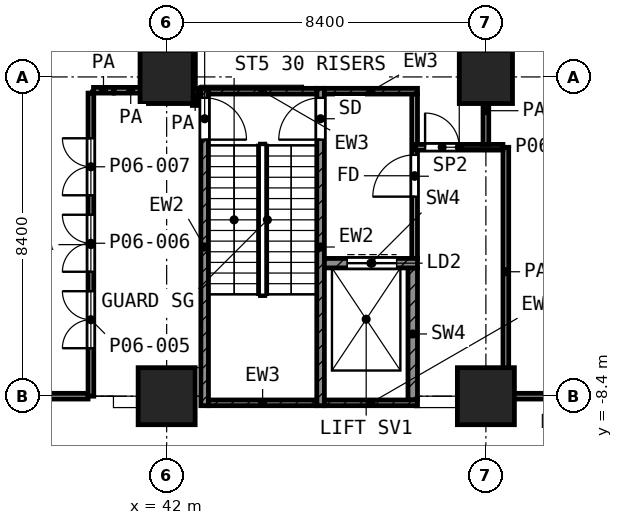
"""IFC4 building model, lengths in metres.
Left out: names, types, materials, properties, quantities, classifications, styles, units other than length and angle.
Written with IfcOpenShell. Run it as: python <this file> out.ifc"""

import sys

from ifc_helpers import new_model, si_unit, direction, frame, frame_2d, origin, origin_2d, place, context, subcontext, project, spatial, rectangle, extrude, element, fill, save


model = new_model("IFC4")
c1 = context("Model", 3, precision=1e-05, world=origin(), true_north=direction((0.0, 1.0)))
c2 = subcontext(c1, "Body", "Model", "MODEL_VIEW")
j1 = project(units=[si_unit("LENGTHUNIT", "METRE"), si_unit("PLANEANGLEUNIT", "RADIAN")], contexts=[c1])
p1 = place(None, origin())
s1 = spatial("IfcSite", under=j1, at=p1, CompositionType="ELEMENT")
p2 = place(p1, origin())
s2 = spatial("IfcBuilding", under=s1, at=p2, CompositionType="ELEMENT")
p3 = place(p2, frame((0.0, 0.0, 29.0)))
s3 = spatial("IfcBuildingStorey", under=s2, at=p3, CompositionType="ELEMENT", Elevation=29.0)
for number, where, z_axis, x_axis in (
    (1, (42.0, 0.0, 0.0), (0.0, 0.0, 1.0), (1.0, 0.0, 0.0)),
    (2, (50.4, 0.0, 0.0), (0.0, 0.0, 1.0), (1.0, 0.0, 0.0)),
):
    element("IfcColumn", number, at=place(p3, frame(where, z_axis=z_axis, x_axis=x_axis)), inside=s3, PredefinedType="COLUMN", context=c2, shape_type="SweptSolid", body=[
        extrude(rectangle(XDim=1.4, YDim=1.4, at=origin_2d()), origin(), (0.0, 0.0, 1.0), 5.2),
    ])
for number, where, z_axis, x_axis in (
    (3, (42.0, -8.4, 0.0), (0.0, 0.0, 1.0), (1.0, 0.0, 0.0)),
    (4, (50.4, -8.4, 0.0), (0.0, 0.0, 1.0), (1.0, 0.0, 0.0)),
):
    element("IfcColumn", number, at=place(p3, frame(where, z_axis=z_axis, x_axis=x_axis)), inside=s3, PredefinedType="COLUMN", context=c2, shape_type="SweptSolid", body=[
        extrude(rectangle(XDim=1.5, YDim=1.5, at=origin_2d()), origin(), (0.0, 0.0, 1.0), 5.2),
    ])
p4 = place(p3, frame((43.0, -8.65, 0.0), z_axis=(0.0, 0.0, 1.0), x_axis=(0.0, 1.0, 0.0)))
e5 = element("IfcWall", 5, at=p4, inside=s3, PredefinedType="SHEAR", context=c2, shape_type="SweptSolid", body=[
    extrude(rectangle(XDim=8.35, YDim=0.2, at=frame_2d((4.175, 0.0))), origin(), (0.0, 0.0, 1.0), 4.7),
])
p5 = place(p4, frame((7.0, 0.0, 0.0)))
e6 = element("IfcOpeningElement", 6, at=p5, cuts=e5, PredefinedType="OPENING", context=c2, shape_type="SweptSolid", body=[
    extrude(rectangle(XDim=1.1, YDim=2.1, at=frame_2d((0.55, 1.05))), frame((0.0, 0.11, 0.0), z_axis=(0.0, -1.0, 0.0), x_axis=(1.0, 0.0, 0.0)), (0.0, 0.0, 1.0), 0.22),
])
p6 = place(p3, frame((46.05, -8.65, 0.0), z_axis=(0.0, 0.0, 1.0), x_axis=(0.0, 1.0, 0.0)))
e7 = element("IfcWall", 7, at=p6, inside=s3, PredefinedType="SHEAR", context=c2, shape_type="SweptSolid", body=[
    extrude(rectangle(XDim=8.35, YDim=0.2, at=frame_2d((4.175, 0.0))), origin(), (0.0, 0.0, 1.0), 4.7),
])
p7 = place(p6, frame((7.0, 0.0, 0.0)))
e8 = element("IfcOpeningElement", 8, at=p7, cuts=e7, PredefinedType="OPENING", context=c2, shape_type="SweptSolid", body=[
    extrude(rectangle(XDim=1.1, YDim=2.1, at=frame_2d((0.55, 1.05))), frame((0.0, 0.11, 0.0), z_axis=(0.0, -1.0, 0.0), x_axis=(1.0, 0.0, 0.0)), (0.0, 0.0, 1.0), 0.22),
])
p8 = place(p3, frame((43.1, -0.375, 0.0), z_axis=(0.0, 0.0, 1.0), x_axis=(1.0, 0.0, 0.0)))
e9 = element("IfcWall", 9, at=p8, inside=s3, PredefinedType="SHEAR", context=c2, shape_type="SweptSolid", body=[
    extrude(rectangle(XDim=2.85, YDim=0.15, at=frame_2d((1.425, 0.0))), origin(), (0.0, 0.0, 1.0), 4.7),
])
p9 = place(p3, frame((46.15, -0.375, 0.0), z_axis=(0.0, 0.0, 1.0), x_axis=(1.0, 0.0, 0.0)))
e10 = element("IfcWall", 10, at=p9, inside=s3, PredefinedType="SHEAR", context=c2, shape_type="SweptSolid", body=[
    extrude(rectangle(XDim=2.45, YDim=0.15, at=frame_2d((1.225, 0.0))), origin(), (0.0, 0.0, 1.0), 4.7),
])
p10 = place(p3, frame((43.1, -8.575, 0.0), z_axis=(0.0, 0.0, 1.0), x_axis=(1.0, 0.0, 0.0)))
e11 = element("IfcWall", 11, at=p10, inside=s3, PredefinedType="SHEAR", context=c2, shape_type="SweptSolid", body=[
    extrude(rectangle(XDim=2.85, YDim=0.15, at=frame_2d((1.425, 0.0))), origin(), (0.0, 0.0, 1.0), 4.7),
])
p11 = place(p3, frame((46.15, -8.575, 0.0), z_axis=(0.0, 0.0, 1.0), x_axis=(1.0, 0.0, 0.0)))
e12 = element("IfcWall", 12, at=p11, inside=s3, PredefinedType="SHEAR", context=c2, shape_type="SweptSolid", body=[
    extrude(rectangle(XDim=2.45, YDim=0.15, at=frame_2d((1.225, 0.0))), origin(), (0.0, 0.0, 1.0), 4.7),
])
p12 = place(p3, frame((46.15, -4.9, 0.0), z_axis=(0.0, 0.0, 1.0), x_axis=(1.0, 0.0, 0.0)))
e13 = element("IfcWall", 13, at=p12, inside=s3, PredefinedType="SHEAR", context=c2, shape_type="SweptSolid", body=[
    extrude(rectangle(XDim=2.45, YDim=0.25, at=frame_2d((1.225, 0.0))), origin(), (0.0, 0.0, 1.0), 4.7),
])
p13 = place(p12, frame((0.6, 0.0, 0.0)))
e14 = element("IfcOpeningElement", 14, at=p13, cuts=e13, PredefinedType="OPENING", context=c2, shape_type="SweptSolid", body=[
    extrude(rectangle(XDim=1.3, YDim=2.1, at=frame_2d((0.65, 1.05))), frame((0.0, 0.135, 0.0), z_axis=(0.0, -1.0, 0.0), x_axis=(1.0, 0.0, 0.0)), (0.0, 0.0, 1.0), 0.27),
])
p14 = place(p3, frame((48.475, -8.5, 0.0), z_axis=(0.0, 0.0, 1.0), x_axis=(0.0, 1.0, 0.0)))
e15 = element("IfcWall", 15, at=p14, inside=s3, PredefinedType="SHEAR", context=c2, shape_type="SweptSolid", body=[
    extrude(rectangle(XDim=3.475, YDim=0.25, at=frame_2d((1.738, 0.0))), origin(), (0.0, 0.0, 1.0), 4.7),
])
p15 = place(p3, frame((48.525, -4.775, 0.0), z_axis=(0.0, 0.0, 1.0), x_axis=(0.0, 1.0, 0.0)))
e16 = element("IfcWall", 16, at=p15, inside=s3, PredefinedType="PARTITIONING", context=c2, shape_type="SweptSolid", body=[
    extrude(rectangle(XDim=4.325, YDim=0.15, at=frame_2d((2.163, 0.0))), origin(), (0.0, 0.0, 1.0), 4.7),
])
p16 = place(p15, frame((1.625, 0.0, 0.0)))
e17 = element("IfcOpeningElement", 17, at=p16, cuts=e16, PredefinedType="OPENING", context=c2, shape_type="SweptSolid", body=[
    extrude(rectangle(XDim=1.1, YDim=2.1, at=frame_2d((0.55, 1.05))), frame((0.0, 0.085, 0.0), z_axis=(0.0, -1.0, 0.0), x_axis=(1.0, 0.0, 0.0)), (0.0, 0.0, 1.0), 0.17),
])
p17 = place(p3, frame((25.2, -8.4, 0.0), z_axis=(0.0, 0.0, 1.0), x_axis=(1.0, 0.0, 0.0)))
e18 = element("IfcWall", 18, at=p17, inside=s3, PredefinedType="PARTITIONING", context=c2, shape_type="SweptSolid", body=[
    extrude(rectangle(XDim=14.732, YDim=0.15, at=frame_2d((7.366, 0.0))), origin(), (0.0, 0.0, 1.0), 4.7),
])
p18 = place(p17, frame((1.35, 0.0, 0.0)))
e19 = element("IfcOpeningElement", 19, at=p18, cuts=e18, PredefinedType="OPENING", context=c2, shape_type="SweptSolid", body=[
    extrude(rectangle(XDim=1.2, YDim=2.1, at=frame_2d((0.6, 1.05))), frame((0.0, 0.085, 0.0), z_axis=(0.0, -1.0, 0.0), x_axis=(1.0, 0.0, 0.0)), (0.0, 0.0, 1.0), 0.17),
])
p19 = place(p17, frame((5.4, 0.0, 0.0)))
e20 = element("IfcOpeningElement", 20, at=p19, cuts=e18, PredefinedType="OPENING", context=c2, shape_type="SweptSolid", body=[
    extrude(rectangle(XDim=1.5, YDim=2.1, at=frame_2d((0.75, 1.05))), frame((0.0, 0.085, 0.0), z_axis=(0.0, -1.0, 0.0), x_axis=(1.0, 0.0, 0.0)), (0.0, 0.0, 1.0), 0.17),
])
p20 = place(p17, frame((9.25, 0.0, 0.0)))
e21 = element("IfcOpeningElement", 21, at=p20, cuts=e18, PredefinedType="OPENING", context=c2, shape_type="SweptSolid", body=[
    extrude(rectangle(XDim=1.5, YDim=2.1, at=frame_2d((0.75, 1.05))), frame((0.0, 0.085, 0.0), z_axis=(0.0, -1.0, 0.0), x_axis=(1.0, 0.0, 0.0)), (0.0, 0.0, 1.0), 0.17),
])
p21 = place(p17, frame((11.1, 0.0, 0.0)))
e22 = element("IfcOpeningElement", 22, at=p21, cuts=e18, PredefinedType="OPENING", context=c2, shape_type="SweptSolid", body=[
    extrude(rectangle(XDim=1.5, YDim=2.1, at=frame_2d((0.75, 1.05))), frame((0.0, 0.085, 0.0), z_axis=(0.0, -1.0, 0.0), x_axis=(1.0, 0.0, 0.0)), (0.0, 0.0, 1.0), 0.17),
])
p22 = place(p3, frame((51.0, -8.4, 0.0), z_axis=(0.0, 0.0, 1.0), x_axis=(1.0, 0.0, 0.0)))
e23 = element("IfcWall", 23, at=p22, inside=s3, PredefinedType="PARTITIONING", context=c2, shape_type="SweptSolid", body=[
    extrude(rectangle(XDim=26.2, YDim=0.15, at=frame_2d((13.1, 0.0))), origin(), (0.0, 0.0, 1.0), 4.7),
])
p23 = place(p22, frame((1.144, 0.0, 0.0)))
e24 = element("IfcOpeningElement", 24, at=p23, cuts=e23, PredefinedType="OPENING", context=c2, shape_type="SweptSolid", body=[
    extrude(rectangle(XDim=1.5, YDim=2.1, at=frame_2d((0.75, 1.05))), frame((0.0, 0.085, 0.0), z_axis=(0.0, -1.0, 0.0), x_axis=(1.0, 0.0, 0.0)), (0.0, 0.0, 1.0), 0.17),
])
p24 = place(p22, frame((3.112, 0.0, 0.0)))
e25 = element("IfcOpeningElement", 25, at=p24, cuts=e23, PredefinedType="OPENING", context=c2, shape_type="SweptSolid", body=[
    extrude(rectangle(XDim=1.5, YDim=2.1, at=frame_2d((0.75, 1.05))), frame((0.0, 0.085, 0.0), z_axis=(0.0, -1.0, 0.0), x_axis=(1.0, 0.0, 0.0)), (0.0, 0.0, 1.0), 0.17),
])
p25 = place(p22, frame((5.081, 0.0, 0.0)))
e26 = element("IfcOpeningElement", 26, at=p25, cuts=e23, PredefinedType="OPENING", context=c2, shape_type="SweptSolid", body=[
    extrude(rectangle(XDim=1.5, YDim=2.1, at=frame_2d((0.75, 1.05))), frame((0.0, 0.085, 0.0), z_axis=(0.0, -1.0, 0.0), x_axis=(1.0, 0.0, 0.0)), (0.0, 0.0, 1.0), 0.17),
])
p26 = place(p22, frame((9.15, 0.0, 0.0)))
e27 = element("IfcOpeningElement", 27, at=p26, cuts=e23, PredefinedType="OPENING", context=c2, shape_type="SweptSolid", body=[
    extrude(rectangle(XDim=1.5, YDim=2.1, at=frame_2d((0.75, 1.05))), frame((0.0, 0.085, 0.0), z_axis=(0.0, -1.0, 0.0), x_axis=(1.0, 0.0, 0.0)), (0.0, 0.0, 1.0), 0.17),
])
p27 = place(p22, frame((11.25, 0.0, 0.0)))
e28 = element("IfcOpeningElement", 28, at=p27, cuts=e23, PredefinedType="OPENING", context=c2, shape_type="SweptSolid", body=[
    extrude(rectangle(XDim=1.5, YDim=2.1, at=frame_2d((0.75, 1.05))), frame((0.0, 0.085, 0.0), z_axis=(0.0, -1.0, 0.0), x_axis=(1.0, 0.0, 0.0)), (0.0, 0.0, 1.0), 0.17),
])
p28 = place(p22, frame((13.35, 0.0, 0.0)))
e29 = element("IfcOpeningElement", 29, at=p28, cuts=e23, PredefinedType="OPENING", context=c2, shape_type="SweptSolid", body=[
    extrude(rectangle(XDim=1.5, YDim=2.1, at=frame_2d((0.75, 1.05))), frame((0.0, 0.085, 0.0), z_axis=(0.0, -1.0, 0.0), x_axis=(1.0, 0.0, 0.0)), (0.0, 0.0, 1.0), 0.17),
])
p29 = place(p22, frame((17.65, 0.0, 0.0)))
e30 = element("IfcOpeningElement", 30, at=p29, cuts=e23, PredefinedType="OPENING", context=c2, shape_type="SweptSolid", body=[
    extrude(rectangle(XDim=1.0, YDim=2.1, at=frame_2d((0.5, 1.05))), frame((0.0, 0.085, 0.0), z_axis=(0.0, -1.0, 0.0), x_axis=(1.0, 0.0, 0.0)), (0.0, 0.0, 1.0), 0.17),
])
p30 = place(p22, frame((20.875, 0.0, 0.0)))
e31 = element("IfcOpeningElement", 31, at=p30, cuts=e23, PredefinedType="OPENING", context=c2, shape_type="SweptSolid", body=[
    extrude(rectangle(XDim=1.5, YDim=2.1, at=frame_2d((0.75, 1.05))), frame((0.0, 0.085, 0.0), z_axis=(0.0, -1.0, 0.0), x_axis=(1.0, 0.0, 0.0)), (0.0, 0.0, 1.0), 0.17),
])
p31 = place(p22, frame((22.7, 0.0, 0.0)))
e32 = element("IfcOpeningElement", 32, at=p31, cuts=e23, PredefinedType="OPENING", context=c2, shape_type="SweptSolid", body=[
    extrude(rectangle(XDim=1.1, YDim=2.1, at=frame_2d((0.55, 1.05))), frame((0.0, 0.085, 0.0), z_axis=(0.0, -1.0, 0.0), x_axis=(1.0, 0.0, 0.0)), (0.0, 0.0, 1.0), 0.17),
])
p32 = place(p3, frame((48.55, -1.85, 0.0), z_axis=(0.0, 0.0, 1.0), x_axis=(1.0, 0.0, 0.0)))
e33 = element("IfcWall", 33, at=p32, inside=s3, PredefinedType="PARTITIONING", context=c2, shape_type="SweptSolid", body=[
    extrude(rectangle(XDim=2.298, YDim=0.15, at=frame_2d((1.149, 0.0))), origin(), (0.0, 0.0, 1.0), 4.7),
])
p33 = place(p32, frame((0.25, 0.0, 0.0)))
e34 = element("IfcOpeningElement", 34, at=p33, cuts=e33, PredefinedType="OPENING", context=c2, shape_type="SweptSolid", body=[
    extrude(rectangle(XDim=0.9, YDim=2.1, at=frame_2d((0.45, 1.05))), frame((0.0, 0.085, 0.0), z_axis=(0.0, -1.0, 0.0), x_axis=(1.0, 0.0, 0.0)), (0.0, 0.0, 1.0), 0.17),
])
p34 = place(p3, frame((40.076, -0.35, 0.0), z_axis=(0.0, 0.0, 1.0), x_axis=(1.0, 0.0, 0.0)))
e35 = element("IfcWall", 35, at=p34, inside=s3, PredefinedType="PARTITIONING", context=c2, shape_type="SweptSolid", body=[
    extrude(rectangle(XDim=0.524, YDim=0.15, at=frame_2d((0.262, 0.0))), origin(), (0.0, 0.0, 1.0), 4.7),
])
p35 = place(p3, frame((40.62, -0.35, 0.0), z_axis=(0.0, 0.0, 1.0), x_axis=(1.0, 0.0, 0.0)))
e36 = element("IfcWall", 36, at=p35, inside=s3, PredefinedType="PARTITIONING", context=c2, shape_type="SweptSolid", body=[
    extrude(rectangle(XDim=0.868, YDim=0.15, at=frame_2d((0.434, 0.0))), origin(), (0.0, 0.0, 1.0), 4.7),
])
p36 = place(p3, frame((40.007, -8.4, 0.0), z_axis=(0.0, 0.0, 1.0), x_axis=(0.0, 1.0, 0.0)))
e37 = element("IfcWall", 37, at=p36, inside=s3, PredefinedType="PARTITIONING", context=c2, shape_type="SweptSolid", body=[
    extrude(rectangle(XDim=7.975, YDim=0.15, at=frame_2d((3.987, 0.0))), origin(), (0.0, 0.0, 1.0), 4.7),
])
p37 = place(p36, frame((1.262, 0.0, 0.0)))
e38 = element("IfcOpeningElement", 38, at=p37, cuts=e37, PredefinedType="OPENING", context=c2, shape_type="SweptSolid", body=[
    extrude(rectangle(XDim=1.5, YDim=2.1, at=frame_2d((0.75, 1.05))), frame((0.0, 0.085, 0.0), z_axis=(0.0, -1.0, 0.0), x_axis=(1.0, 0.0, 0.0)), (0.0, 0.0, 1.0), 0.17),
])
p38 = place(p36, frame((3.274, 0.0, 0.0)))
e39 = element("IfcOpeningElement", 39, at=p38, cuts=e37, PredefinedType="OPENING", context=c2, shape_type="SweptSolid", body=[
    extrude(rectangle(XDim=1.5, YDim=2.1, at=frame_2d((0.75, 1.05))), frame((0.0, 0.085, 0.0), z_axis=(0.0, -1.0, 0.0), x_axis=(1.0, 0.0, 0.0)), (0.0, 0.0, 1.0), 0.17),
])
p39 = place(p36, frame((5.286, 0.0, 0.0)))
e40 = element("IfcOpeningElement", 40, at=p39, cuts=e37, PredefinedType="OPENING", context=c2, shape_type="SweptSolid", body=[
    extrude(rectangle(XDim=1.5, YDim=2.1, at=frame_2d((0.75, 1.05))), frame((0.0, 0.085, 0.0), z_axis=(0.0, -1.0, 0.0), x_axis=(1.0, 0.0, 0.0)), (0.0, 0.0, 1.0), 0.17),
])
p40 = place(p3, frame((42.68, -0.3, 0.0), z_axis=(0.0, 0.0, 1.0), x_axis=(0.0, 1.0, 0.0)))
e41 = element("IfcWall", 41, at=p40, inside=s3, PredefinedType="PARTITIONING", context=c2, shape_type="SweptSolid", body=[
    extrude(rectangle(XDim=3.98, YDim=0.15, at=frame_2d((1.99, 0.0))), origin(), (0.0, 0.0, 1.0), 4.7),
])
p41 = place(p3, frame((42.75, -0.75, 0.0), z_axis=(0.0, 0.0, 1.0), x_axis=(0.0, 1.0, 0.0)))
e42 = element("IfcWall", 42, at=p41, inside=s3, PredefinedType="PARTITIONING", context=c2, shape_type="SweptSolid", body=[
    extrude(rectangle(XDim=0.45, YDim=0.15, at=frame_2d((0.225, 0.0))), origin(), (0.0, 0.0, 1.0), 4.7),
])
p42 = place(p3, frame((50.4, -1.775, 0.0), z_axis=(0.0, 0.0, 1.0), x_axis=(0.0, 1.0, 0.0)))
e43 = element("IfcWall", 43, at=p42, inside=s3, PredefinedType="PARTITIONING", context=c2, shape_type="SweptSolid", body=[
    extrude(rectangle(XDim=1.773, YDim=0.15, at=frame_2d((0.886, 0.0))), origin(), (0.0, 0.0, 1.0), 4.7),
])
p43 = place(p3, frame((50.925, -8.4, 0.0), z_axis=(0.0, 0.0, 1.0), x_axis=(0.0, 1.0, 0.0)))
e44 = element("IfcWall", 44, at=p43, inside=s3, PredefinedType="PARTITIONING", context=c2, shape_type="SweptSolid", body=[
    extrude(rectangle(XDim=6.548, YDim=0.15, at=frame_2d((3.274, 0.0))), origin(), (0.0, 0.0, 1.0), 4.7),
])
p44 = place(p5, frame((1.1, 0.0, 0.0), z_axis=(0.0, 0.0, 1.0), x_axis=(-1.0, 0.0, 0.0)))
e45 = element("IfcDoor", 45, at=p44, inside=s3, OperationType="SINGLE_SWING_LEFT", PredefinedType="DOOR", context=c2, shape_type="SweptSolid", body=[
    extrude(rectangle(XDim=1.1, YDim=2.1, at=frame_2d((0.55, 1.05))), frame((0.0, 0.025, 0.0), z_axis=(0.0, -1.0, 0.0), x_axis=(1.0, 0.0, 0.0)), (0.0, 0.0, 1.0), 0.05),
])
fill(e6, e45)
p45 = place(p7, origin())
e46 = element("IfcDoor", 46, at=p45, inside=s3, OperationType="SINGLE_SWING_LEFT", PredefinedType="DOOR", context=c2, shape_type="SweptSolid", body=[
    extrude(rectangle(XDim=1.1, YDim=2.1, at=frame_2d((0.55, 1.05))), frame((0.0, 0.025, 0.0), z_axis=(0.0, -1.0, 0.0), x_axis=(1.0, 0.0, 0.0)), (0.0, 0.0, 1.0), 0.05),
])
fill(e8, e46)
p46 = place(p13, origin())
e47 = element("IfcDoor", 47, at=p46, inside=s3, OperationType="DOUBLE_DOOR_SLIDING", PredefinedType="DOOR", context=c2, shape_type="SweptSolid", body=[
    extrude(rectangle(XDim=1.3, YDim=2.1, at=frame_2d((0.65, 1.05))), frame((0.0, 0.025, 0.0), z_axis=(0.0, -1.0, 0.0), x_axis=(1.0, 0.0, 0.0)), (0.0, 0.0, 1.0), 0.05),
])
fill(e14, e47)
p47 = place(p16, origin())
e48 = element("IfcDoor", 48, at=p47, inside=s3, OperationType="SINGLE_SWING_LEFT", PredefinedType="DOOR", context=c2, shape_type="SweptSolid", body=[
    extrude(rectangle(XDim=1.1, YDim=2.1, at=frame_2d((0.55, 1.05))), frame((0.0, 0.025, 0.0), z_axis=(0.0, -1.0, 0.0), x_axis=(1.0, 0.0, 0.0)), (0.0, 0.0, 1.0), 0.05),
])
fill(e17, e48)
p48 = place(p37, origin())
e49 = element("IfcDoor", 49, at=p48, inside=s3, OperationType="DOUBLE_DOOR_SINGLE_SWING", PredefinedType="DOOR", context=c2, shape_type="SweptSolid", body=[
    extrude(rectangle(XDim=1.5, YDim=2.1, at=frame_2d((0.75, 1.05))), frame((0.0, 0.025, 0.0), z_axis=(0.0, -1.0, 0.0), x_axis=(1.0, 0.0, 0.0)), (0.0, 0.0, 1.0), 0.05),
])
fill(e38, e49)
p49 = place(p38, origin())
e50 = element("IfcDoor", 50, at=p49, inside=s3, OperationType="DOUBLE_DOOR_SINGLE_SWING", PredefinedType="DOOR", context=c2, shape_type="SweptSolid", body=[
    extrude(rectangle(XDim=1.5, YDim=2.1, at=frame_2d((0.75, 1.05))), frame((0.0, 0.025, 0.0), z_axis=(0.0, -1.0, 0.0), x_axis=(1.0, 0.0, 0.0)), (0.0, 0.0, 1.0), 0.05),
])
fill(e39, e50)
p50 = place(p39, origin())
e51 = element("IfcDoor", 51, at=p50, inside=s3, OperationType="DOUBLE_DOOR_SINGLE_SWING", PredefinedType="DOOR", context=c2, shape_type="SweptSolid", body=[
    extrude(rectangle(XDim=1.5, YDim=2.1, at=frame_2d((0.75, 1.05))), frame((0.0, 0.025, 0.0), z_axis=(0.0, -1.0, 0.0), x_axis=(1.0, 0.0, 0.0)), (0.0, 0.0, 1.0), 0.05),
])
fill(e40, e51)
p51 = place(p33, origin())
e52 = element("IfcDoor", 52, at=p51, inside=s3, OperationType="SINGLE_SWING_LEFT", PredefinedType="DOOR", context=c2, shape_type="SweptSolid", body=[
    extrude(rectangle(XDim=0.9, YDim=2.1, at=frame_2d((0.45, 1.05))), frame((0.0, 0.025, 0.0), z_axis=(0.0, -1.0, 0.0), x_axis=(1.0, 0.0, 0.0)), (0.0, 0.0, 1.0), 0.05),
])
fill(e34, e52)
save(model, sys.argv[1])
